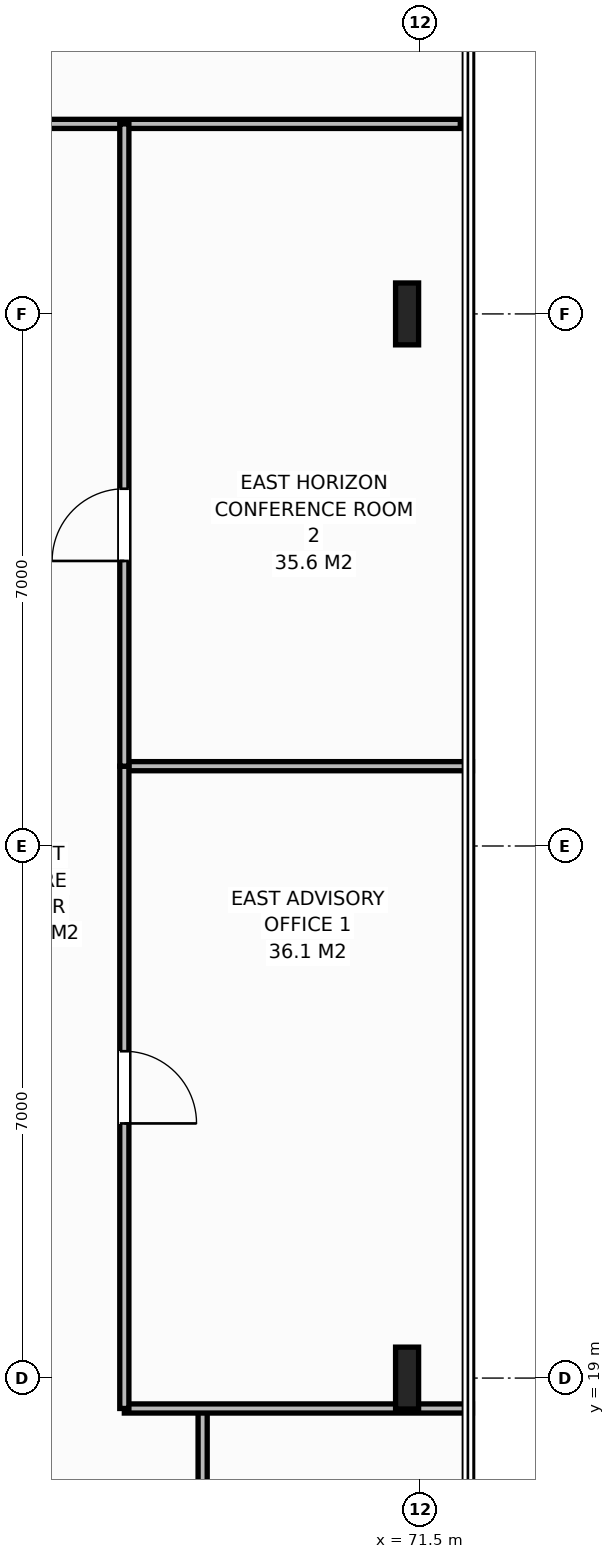
"""IFC4 building model, lengths in metres.
Left out: names, types, materials, properties, quantities, classifications, styles, units other than length and angle.
Written with IfcOpenShell. Run it as: python <this file> out.ifc"""

import sys

from ifc_helpers import new_model, si_unit, direction, frame, frame_2d, origin, origin_2d, place, context, subcontext, project, spatial, rectangle, i_section, extrude, element, fill, save


model = new_model("IFC4")
c1 = context("Model", 3, precision=1e-05, world=origin(), true_north=direction((0.0, 1.0)))
c2 = subcontext(c1, "Body", "Model", "MODEL_VIEW")
j1 = project(units=[si_unit("LENGTHUNIT", "METRE"), si_unit("PLANEANGLEUNIT", "RADIAN")], contexts=[c1])
p1 = place(None, origin())
s1 = spatial("IfcSite", under=j1, at=p1, CompositionType="ELEMENT")
p2 = place(p1, origin())
s2 = spatial("IfcBuilding", under=s1, at=p2, CompositionType="ELEMENT")
p3 = place(p2, frame((0.0, 0.0, 240.4)))
s3 = spatial("IfcBuildingStorey", under=s2, at=p3, CompositionType="ELEMENT", Elevation=240.4)
for number, where, z_axis, x_axis in (
    (1, (71.32, 19.0, 0.0), (0.0, 0.0, 1.0), (1.0, 0.0, 0.0)),
    (2, (71.32, 33.0, 0.0), (0.0, 0.0, 1.0), (1.0, 0.0, 0.0)),
):
    element("IfcColumn", number, at=place(p3, frame(where, z_axis=z_axis, x_axis=x_axis)), inside=s3, PredefinedType="COLUMN", context=c2, shape_type="SweptSolid", body=[
        extrude(i_section(OverallWidth=0.303, OverallDepth=0.814, WebThickness=0.021, FlangeThickness=0.04, at=origin_2d()), origin(), (0.0, 0.0, 1.0), 3.8),
    ])
p4 = place(p3, frame((68.63, 16.5, 0.0), z_axis=(0.0, 0.0, 1.0), x_axis=(0.0, 1.0, 0.0)))
e3 = element("IfcWall", 3, at=p4, inside=s3, PredefinedType="PARTITIONING", context=c2, shape_type="SweptSolid", body=[
    extrude(rectangle(XDim=2.1, YDim=0.12, at=frame_2d((1.05, 0.0))), origin(), (0.0, 0.0, 1.0), 3.58),
])
p5 = place(p3, frame((60.378, 35.5, 0.0), z_axis=(0.0, 0.0, 1.0), x_axis=(1.0, 0.0, 0.0)))
e4 = element("IfcWall", 4, at=p5, inside=s3, PredefinedType="PARTITIONING", context=c2, shape_type="SweptSolid", body=[
    extrude(rectangle(XDim=11.642, YDim=0.12, at=frame_2d((5.821, 0.0))), origin(), (0.0, 0.0, 1.0), 3.58),
])
p6 = place(p5, frame((0.48, 0.0, 0.0)))
e5 = element("IfcOpeningElement", 5, at=p6, cuts=e4, PredefinedType="OPENING", context=c2, shape_type="SweptSolid", body=[
    extrude(rectangle(XDim=0.95, YDim=2.15, at=frame_2d((0.475, 1.075))), frame((0.0, 0.07, 0.0), z_axis=(0.0, -1.0, 0.0), x_axis=(1.0, 0.0, 0.0)), (0.0, 0.0, 1.0), 0.14),
])
for number, where, z_axis, x_axis in (
    (6, (67.6, 18.6, 0.0), (0.0, 0.0, 1.0), (1.0, 0.0, 0.0)),
    (7, (67.6, 27.05, 0.0), (0.0, 0.0, 1.0), (1.0, 0.0, 0.0)),
):
    element("IfcWall", number, at=place(p3, frame(where, z_axis=z_axis, x_axis=x_axis)), inside=s3, PredefinedType="PARTITIONING", context=c2, shape_type="SweptSolid", body=[
        extrude(rectangle(XDim=4.58, YDim=0.12, at=frame_2d((2.29, 0.0))), origin(), (0.0, 0.0, 1.0), 3.58),
    ])
p7 = place(p3, frame((67.6, 18.6, 0.0), z_axis=(0.0, 0.0, 1.0), x_axis=(0.0, 1.0, 0.0)))
e8 = element("IfcWall", 8, at=p7, inside=s3, PredefinedType="PARTITIONING", context=c2, shape_type="SweptSolid", body=[
    extrude(rectangle(XDim=8.45, YDim=0.12, at=frame_2d((4.225, 0.0))), origin(), (0.0, 0.0, 1.0), 3.58),
])
p8 = place(p7, frame((3.75, 0.0, 0.0)))
e9 = element("IfcOpeningElement", 9, at=p8, cuts=e8, PredefinedType="OPENING", context=c2, shape_type="SweptSolid", body=[
    extrude(rectangle(XDim=0.95, YDim=2.15, at=frame_2d((0.475, 1.075))), frame((0.0, 0.07, 0.0), z_axis=(0.0, -1.0, 0.0), x_axis=(1.0, 0.0, 0.0)), (0.0, 0.0, 1.0), 0.14),
])
p9 = place(p3, frame((67.6, 27.05, 0.0), z_axis=(0.0, 0.0, 1.0), x_axis=(0.0, 1.0, 0.0)))
e10 = element("IfcWall", 10, at=p9, inside=s3, PredefinedType="PARTITIONING", context=c2, shape_type="SweptSolid", body=[
    extrude(rectangle(XDim=8.45, YDim=0.12, at=frame_2d((4.225, 0.0))), origin(), (0.0, 0.0, 1.0), 3.58),
])
p10 = place(p9, frame((2.7, 0.0, 0.0)))
e11 = element("IfcOpeningElement", 11, at=p10, cuts=e10, PredefinedType="OPENING", context=c2, shape_type="SweptSolid", body=[
    extrude(rectangle(XDim=0.95, YDim=2.15, at=frame_2d((0.475, 1.075))), frame((0.0, 0.07, 0.0), z_axis=(0.0, -1.0, 0.0), x_axis=(1.0, 0.0, 0.0)), (0.0, 0.0, 1.0), 0.14),
])
p11 = place(p8, origin())
e12 = element("IfcDoor", 12, at=p11, inside=s3, OperationType="SINGLE_SWING_RIGHT", PredefinedType="DOOR", context=c2, shape_type="SweptSolid", body=[
    extrude(rectangle(XDim=0.95, YDim=2.15, at=frame_2d((0.475, 1.075))), frame((0.0, 0.025, 0.0), z_axis=(0.0, -1.0, 0.0), x_axis=(1.0, 0.0, 0.0)), (0.0, 0.0, 1.0), 0.05),
])
fill(e9, e12)
p12 = place(p10, origin())
e13 = element("IfcDoor", 13, at=p12, inside=s3, OperationType="SINGLE_SWING_LEFT", PredefinedType="DOOR", context=c2, shape_type="SweptSolid", body=[
    extrude(rectangle(XDim=0.95, YDim=2.15, at=frame_2d((0.475, 1.075))), frame((0.0, 0.025, 0.0), z_axis=(0.0, -1.0, 0.0), x_axis=(1.0, 0.0, 0.0)), (0.0, 0.0, 1.0), 0.05),
])
fill(e11, e13)
save(model, sys.argv[1])
